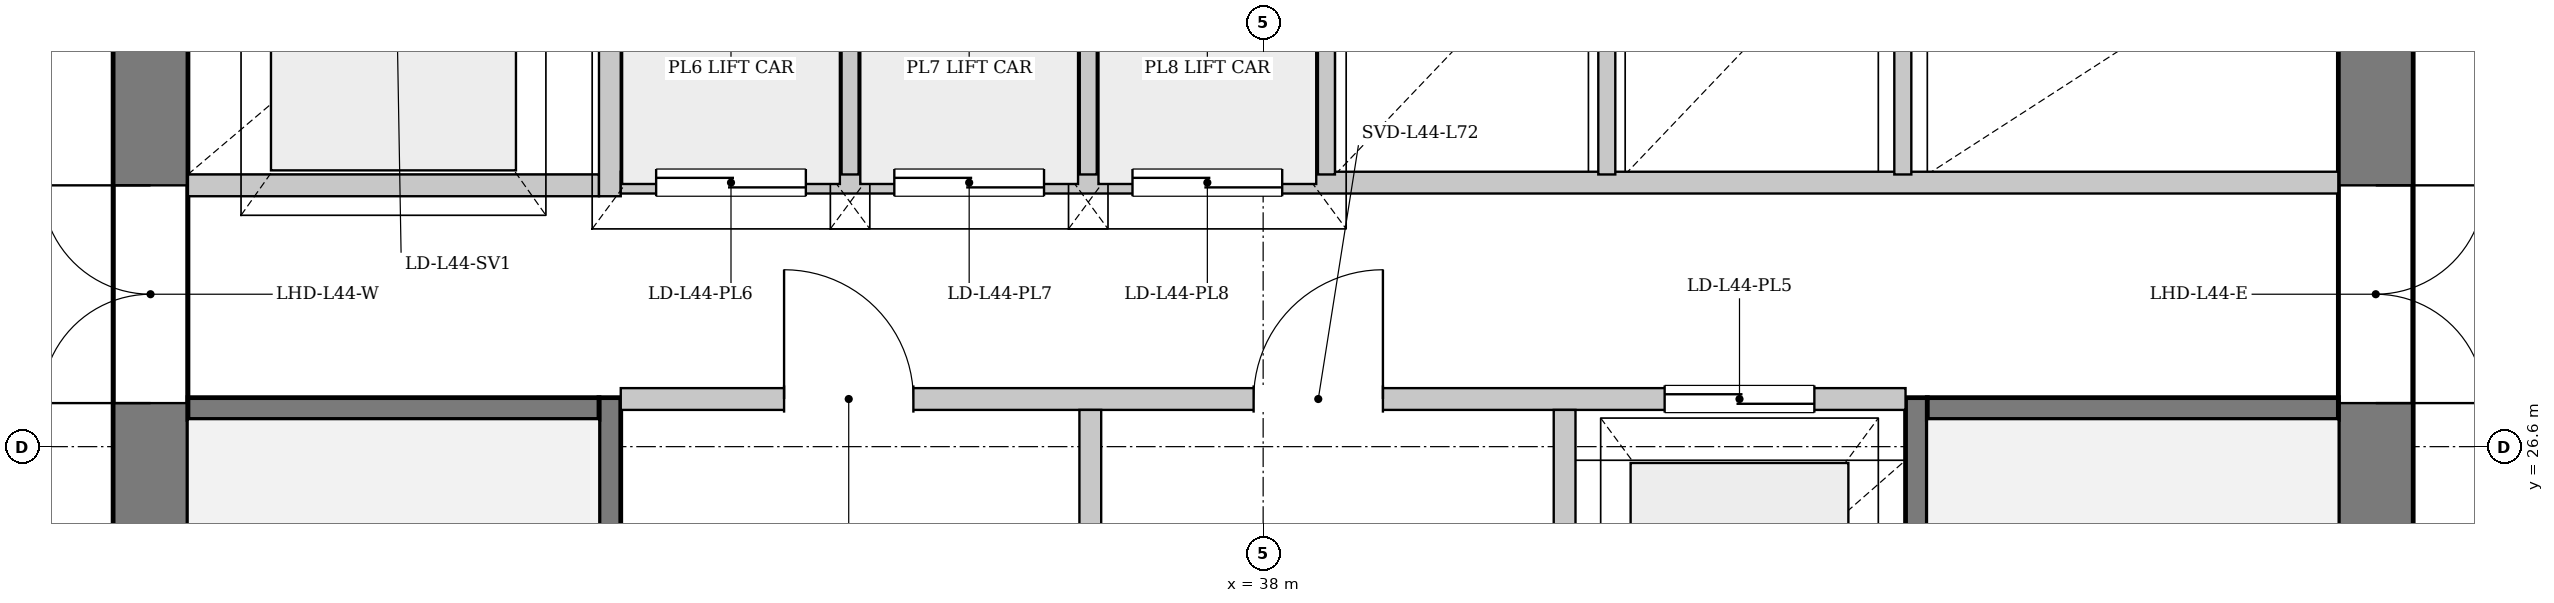
"""IFC4 building model, lengths in metres.
Left out: names, types, materials, properties, quantities, classifications, styles, units other than length and angle.
Written with IfcOpenShell. Run it as: python <this file> out.ifc"""

import sys

from ifc_helpers import new_model, si_unit, direction, frame, frame_2d, origin, place, context, subcontext, project, spatial, rectangle, extrude, source, transform, mapped, element, fill, save


model = new_model("IFC4")
c1 = context("Model", 3, precision=1e-05, world=origin(), true_north=direction((0.0, 1.0)))
c2 = subcontext(c1, "Body", "Model", "MODEL_VIEW")
j1 = project(units=[si_unit("LENGTHUNIT", "METRE"), si_unit("PLANEANGLEUNIT", "RADIAN")], contexts=[c1])
p1 = place(None, origin())
s1 = spatial("IfcSite", under=j1, at=p1, CompositionType="ELEMENT")
p2 = place(p1, origin())
s2 = spatial("IfcBuilding", under=s1, at=p2, CompositionType="ELEMENT")
p3 = place(p2, frame((0.0, 0.0, 167.9)))
s3 = spatial("IfcBuildingStorey", under=s2, at=p3, CompositionType="ELEMENT", Elevation=167.9)
p4 = place(p3, frame((29.825, 19.5, 0.0), z_axis=(0.0, 0.0, 1.0), x_axis=(0.0, 1.0, 0.0)))
e1 = element("IfcWall", 1, at=p4, inside=s3, PredefinedType="SHEAR", context=c2, shape_type="SweptSolid", body=[
    extrude(rectangle(XDim=14.2, YDim=0.55, at=frame_2d((7.1, 0.0))), origin(), (0.0, 0.0, 1.0), 3.33),
])
p5 = place(p4, frame((7.42, 0.0, 0.0)))
e2 = element("IfcOpeningElement", 2, at=p5, cuts=e1, PredefinedType="OPENING", context=c2, shape_type="SweptSolid", body=[
    extrude(rectangle(XDim=1.6, YDim=2.2, at=frame_2d((0.8, 1.1))), frame((0.0, 0.285, 0.0), z_axis=(0.0, -1.0, 0.0), x_axis=(1.0, 0.0, 0.0)), (0.0, 0.0, 1.0), 0.57),
])
p6 = place(p3, frame((46.175, 33.7, 0.0), z_axis=(0.0, 0.0, 1.0), x_axis=(0.0, -1.0, 0.0)))
e3 = element("IfcWall", 3, at=p6, inside=s3, PredefinedType="SHEAR", context=c2, shape_type="SweptSolid", body=[
    extrude(rectangle(XDim=14.2, YDim=0.55, at=frame_2d((7.1, 0.0))), origin(), (0.0, 0.0, 1.0), 3.33),
])
p7 = place(p6, frame((5.18, 0.0, 0.0)))
e4 = element("IfcOpeningElement", 4, at=p7, cuts=e3, PredefinedType="OPENING", context=c2, shape_type="SweptSolid", body=[
    extrude(rectangle(XDim=1.6, YDim=2.2, at=frame_2d((0.8, 1.1))), frame((0.0, 0.285, 0.0), z_axis=(0.0, -1.0, 0.0), x_axis=(1.0, 0.0, 0.0)), (0.0, 0.0, 1.0), 0.57),
])
p8 = place(p6, frame((2.05, 0.0, 0.0)))
e5 = element("IfcOpeningElement", 5, at=p8, cuts=e3, PredefinedType="OPENING", context=c2, shape_type="SweptSolid", body=[
    extrude(rectangle(XDim=0.95, YDim=2.1, at=frame_2d((0.475, 1.05))), frame((0.0, 0.285, 0.0), z_axis=(0.0, -1.0, 0.0), x_axis=(1.0, 0.0, 0.0)), (0.0, 0.0, 1.0), 0.57),
])
p9 = place(p3, frame((33.2, 19.5, 0.0), z_axis=(0.0, 0.0, 1.0), x_axis=(0.0, 1.0, 0.0)))
e6 = element("IfcWall", 6, at=p9, inside=s3, PredefinedType="PARTITIONING", context=c2, shape_type="SweptSolid", body=[
    extrude(rectangle(XDim=7.46, YDim=0.16, at=frame_2d((3.73, 0.0))), origin(), (0.0, 0.0, 1.0), 3.33),
])
p10 = place(p9, frame((0.08, 0.0, 0.0)))
e7 = element("IfcOpeningElement", 7, at=p10, cuts=e6, PredefinedType="OPENING", context=c2, shape_type="SweptSolid", body=[
    extrude(rectangle(XDim=1.32, YDim=2.2, at=frame_2d((0.66, 1.1))), frame((0.0, 0.09, 0.0), z_axis=(0.0, -1.0, 0.0), x_axis=(1.0, 0.0, 0.0)), (0.0, 0.0, 1.0), 0.18),
])
p11 = place(p3, frame((30.1, 26.88, 0.0), z_axis=(0.0, 0.0, 1.0), x_axis=(1.0, 0.0, 0.0)))
e8 = element("IfcWall", 8, at=p11, inside=s3, PredefinedType="PARTITIONING", context=c2, shape_type="SweptSolid", body=[
    extrude(rectangle(XDim=3.02, YDim=0.16, at=frame_2d((1.51, 0.0))), origin(), (0.0, 0.0, 1.0), 3.33),
])
p12 = place(p3, frame((42.8, 26.96, 0.0), z_axis=(0.0, 0.0, 1.0), x_axis=(0.0, -1.0, 0.0)))
e9 = element("IfcWall", 9, at=p12, inside=s3, PredefinedType="PARTITIONING", context=c2, shape_type="SweptSolid", body=[
    extrude(rectangle(XDim=7.46, YDim=0.16, at=frame_2d((3.73, 0.0))), origin(), (0.0, 0.0, 1.0), 3.33),
])
p13 = place(p12, frame((6.06, 0.0, 0.0)))
e10 = element("IfcOpeningElement", 10, at=p13, cuts=e9, PredefinedType="OPENING", context=c2, shape_type="SweptSolid", body=[
    extrude(rectangle(XDim=1.32, YDim=2.2, at=frame_2d((0.66, 1.1))), frame((0.0, 0.09, 0.0), z_axis=(0.0, -1.0, 0.0), x_axis=(1.0, 0.0, 0.0)), (0.0, 0.0, 1.0), 0.18),
])
for number, where, z_axis, x_axis in (
    (11, (42.88, 26.88, 0.0), (0.0, 0.0, 1.0), (1.0, 0.0, 0.0)),
    (12, (30.1, 28.52, 0.0), (0.0, 0.0, 1.0), (1.0, 0.0, 0.0)),
):
    element("IfcWall", number, at=place(p3, frame(where, z_axis=z_axis, x_axis=x_axis)), inside=s3, PredefinedType="PARTITIONING", context=c2, shape_type="SweptSolid", body=[
        extrude(rectangle(XDim=3.02, YDim=0.16, at=frame_2d((1.51, 0.0))), origin(), (0.0, 0.0, 1.0), 3.33),
    ])
p14 = place(p3, frame((33.2, 28.44, 0.0), z_axis=(0.0, 0.0, 1.0), x_axis=(0.0, 1.0, 0.0)))
e13 = element("IfcWall", 13, at=p14, inside=s3, PredefinedType="PARTITIONING", context=c2, shape_type="SweptSolid", body=[
    extrude(rectangle(XDim=5.26, YDim=0.16, at=frame_2d((2.63, 0.0))), origin(), (0.0, 0.0, 1.0), 3.33),
])
p15 = place(p3, frame((33.28, 26.95, 0.0), z_axis=(0.0, 0.0, 1.0), x_axis=(1.0, 0.0, 0.0)))
e14 = element("IfcWall", 14, at=p15, inside=s3, PredefinedType="PARTITIONING", context=c2, shape_type="SweptSolid", body=[
    extrude(rectangle(XDim=9.44, YDim=0.16, at=frame_2d((4.72, 0.0))), origin(), (0.0, 0.0, 1.0), 3.33),
])
p16 = place(p15, frame((1.2, 0.0, 0.0)))
e15 = element("IfcOpeningElement", 15, at=p16, cuts=e14, PredefinedType="OPENING", context=c2, shape_type="SweptSolid", body=[
    extrude(rectangle(XDim=0.95, YDim=2.1, at=frame_2d((0.475, 1.05))), frame((0.0, 0.09, 0.0), z_axis=(0.0, -1.0, 0.0), x_axis=(1.0, 0.0, 0.0)), (0.0, 0.0, 1.0), 0.18),
])
p17 = place(p15, frame((4.65, 0.0, 0.0)))
e16 = element("IfcOpeningElement", 16, at=p17, cuts=e14, PredefinedType="OPENING", context=c2, shape_type="SweptSolid", body=[
    extrude(rectangle(XDim=0.95, YDim=2.1, at=frame_2d((0.475, 1.05))), frame((0.0, 0.09, 0.0), z_axis=(0.0, -1.0, 0.0), x_axis=(1.0, 0.0, 0.0)), (0.0, 0.0, 1.0), 0.18),
])
p18 = place(p15, frame((7.67, 0.0, 0.0)))
e17 = element("IfcOpeningElement", 17, at=p18, cuts=e14, PredefinedType="OPENING", context=c2, shape_type="SweptSolid", body=[
    extrude(rectangle(XDim=1.1, YDim=2.2, at=frame_2d((0.55, 1.1))), frame((0.0, 0.09, 0.0), z_axis=(0.0, -1.0, 0.0), x_axis=(1.0, 0.0, 0.0)), (0.0, 0.0, 1.0), 0.18),
])
for number, where, z_axis, x_axis in (
    (18, (36.73, 24.56, 0.0), (0.0, 0.0, 1.0), (0.0, 1.0, 0.0)),
    (19, (40.215, 24.56, 0.0), (0.0, 0.0, 1.0), (0.0, 1.0, 0.0)),
):
    element("IfcWall", number, at=place(p3, frame(where, z_axis=z_axis, x_axis=x_axis)), inside=s3, PredefinedType="PARTITIONING", context=c2, shape_type="SweptSolid", body=[
        extrude(rectangle(XDim=2.31, YDim=0.16, at=frame_2d((1.155, 0.0))), origin(), (0.0, 0.0, 1.0), 3.33),
    ])
p19 = place(p3, frame((33.28, 28.54, 0.0), z_axis=(0.0, 0.0, 1.0), x_axis=(1.0, 0.0, 0.0)))
e20 = element("IfcWall", 20, at=p19, inside=s3, PredefinedType="PARTITIONING", context=c2, shape_type="SweptSolid", body=[
    extrude(rectangle(XDim=12.62, YDim=0.16, at=frame_2d((6.31, 0.0))), origin(), (0.0, 0.0, 1.0), 3.33),
])
p20 = place(p19, frame((0.26, 0.0, 0.0)))
e21 = element("IfcOpeningElement", 21, at=p20, cuts=e20, PredefinedType="OPENING", context=c2, shape_type="SweptSolid", body=[
    extrude(rectangle(XDim=1.1, YDim=2.2, at=frame_2d((0.55, 1.1))), frame((0.0, 0.09, 0.0), z_axis=(0.0, -1.0, 0.0), x_axis=(1.0, 0.0, 0.0)), (0.0, 0.0, 1.0), 0.18),
])
p21 = place(p19, frame((2.01, 0.0, 0.0)))
e22 = element("IfcOpeningElement", 22, at=p21, cuts=e20, PredefinedType="OPENING", context=c2, shape_type="SweptSolid", body=[
    extrude(rectangle(XDim=1.1, YDim=2.2, at=frame_2d((0.55, 1.1))), frame((0.0, 0.09, 0.0), z_axis=(0.0, -1.0, 0.0), x_axis=(1.0, 0.0, 0.0)), (0.0, 0.0, 1.0), 0.18),
])
p22 = place(p19, frame((3.76, 0.0, 0.0)))
e23 = element("IfcOpeningElement", 23, at=p22, cuts=e20, PredefinedType="OPENING", context=c2, shape_type="SweptSolid", body=[
    extrude(rectangle(XDim=1.1, YDim=2.2, at=frame_2d((0.55, 1.1))), frame((0.0, 0.09, 0.0), z_axis=(0.0, -1.0, 0.0), x_axis=(1.0, 0.0, 0.0)), (0.0, 0.0, 1.0), 0.18),
])
for number, where, z_axis, x_axis in (
    (24, (34.965, 28.6, 0.0), (0.0, 0.0, 1.0), (0.0, 1.0, 0.0)),
    (25, (36.715, 28.6, 0.0), (0.0, 0.0, 1.0), (0.0, 1.0, 0.0)),
    (26, (38.465, 28.6, 0.0), (0.0, 0.0, 1.0), (0.0, 1.0, 0.0)),
    (27, (40.525, 28.6, 0.0), (0.0, 0.0, 1.0), (0.0, 1.0, 0.0)),
    (28, (42.7, 28.6, 0.0), (0.0, 0.0, 1.0), (0.0, 1.0, 0.0)),
):
    element("IfcWall", number, at=place(p3, frame(where, z_axis=z_axis, x_axis=x_axis)), inside=s3, PredefinedType="PARTITIONING", context=c2, shape_type="SweptSolid", body=[
        extrude(rectangle(XDim=1.92, YDim=0.125, at=frame_2d((0.96, 0.0))), origin(), (0.0, 0.0, 1.0), 3.33),
    ])
m1 = source(origin(), c2, "Body", "SweptSolid", [
    extrude(rectangle(XDim=1.6, YDim=2.2, at=frame_2d((0.8, 1.1))), frame((0.0, 0.025, 0.0), z_axis=(0.0, -1.0, 0.0), x_axis=(1.0, 0.0, 0.0)), (0.0, 0.0, 1.0), 0.05),
])
p23 = place(p5, origin())
e29 = element("IfcDoor", 29, at=p23, inside=s3, OperationType="DOUBLE_DOOR_SINGLE_SWING", PredefinedType="DOOR", context=c2, shape_type="MappedRepresentation", body=[
    mapped(m1, transform((0.0, 0.0, 0.0), x_axis=(1.0, 0.0, 0.0), y_axis=(0.0, 1.0, 0.0), z_axis=(0.0, 0.0, 1.0), scale=1.0)),
])
fill(e2, e29)
p24 = place(p7, origin())
e30 = element("IfcDoor", 30, at=p24, inside=s3, OperationType="DOUBLE_DOOR_SINGLE_SWING", PredefinedType="DOOR", context=c2, shape_type="MappedRepresentation", body=[
    mapped(m1, transform((0.0, 0.0, 0.0), x_axis=(1.0, 0.0, 0.0), y_axis=(0.0, 1.0, 0.0), z_axis=(0.0, 0.0, 1.0), scale=1.0)),
])
fill(e4, e30)
m2 = source(origin(), c2, "Body", "SweptSolid", [
    extrude(rectangle(XDim=0.95, YDim=2.1, at=frame_2d((0.475, 1.05))), frame((0.0, 0.025, 0.0), z_axis=(0.0, -1.0, 0.0), x_axis=(1.0, 0.0, 0.0)), (0.0, 0.0, 1.0), 0.05),
])
p25 = place(p16, origin())
e31 = element("IfcDoor", 31, at=p25, inside=s3, OperationType="SINGLE_SWING_LEFT", PredefinedType="DOOR", context=c2, shape_type="MappedRepresentation", body=[
    mapped(m2, transform((0.0, 0.0, 0.0), x_axis=(1.0, 0.0, 0.0), y_axis=(0.0, 1.0, 0.0), z_axis=(0.0, 0.0, 1.0), scale=1.0)),
])
fill(e15, e31)
p26 = place(p17, origin())
e32 = element("IfcDoor", 32, at=p26, inside=s3, OperationType="SINGLE_SWING_RIGHT", PredefinedType="DOOR", context=c2, shape_type="MappedRepresentation", body=[
    mapped(m2, transform((0.0, 0.0, 0.0), x_axis=(1.0, 0.0, 0.0), y_axis=(0.0, 1.0, 0.0), z_axis=(0.0, 0.0, 1.0), scale=1.0)),
])
fill(e16, e32)
m3 = source(origin(), c2, "Body", "SweptSolid", [
    extrude(rectangle(XDim=1.1, YDim=2.2, at=frame_2d((0.55, 1.1))), frame((0.0, 0.025, 0.0), z_axis=(0.0, -1.0, 0.0), x_axis=(1.0, 0.0, 0.0)), (0.0, 0.0, 1.0), 0.05),
])
p27 = place(p18, origin())
e33 = element("IfcDoor", 33, at=p27, inside=s3, OperationType="DOUBLE_DOOR_SLIDING", PredefinedType="DOOR", context=c2, shape_type="MappedRepresentation", body=[
    mapped(m3, transform((0.0, 0.0, 0.0), x_axis=(1.0, 0.0, 0.0), y_axis=(0.0, 1.0, 0.0), z_axis=(0.0, 0.0, 1.0), scale=1.0)),
])
fill(e17, e33)
p28 = place(p20, origin())
e34 = element("IfcDoor", 34, at=p28, inside=s3, OperationType="DOUBLE_DOOR_SLIDING", PredefinedType="DOOR", context=c2, shape_type="MappedRepresentation", body=[
    mapped(m3, transform((0.0, 0.0, 0.0), x_axis=(1.0, 0.0, 0.0), y_axis=(0.0, 1.0, 0.0), z_axis=(0.0, 0.0, 1.0), scale=1.0)),
])
fill(e21, e34)
p29 = place(p21, origin())
e35 = element("IfcDoor", 35, at=p29, inside=s3, OperationType="DOUBLE_DOOR_SLIDING", PredefinedType="DOOR", context=c2, shape_type="MappedRepresentation", body=[
    mapped(m3, transform((0.0, 0.0, 0.0), x_axis=(1.0, 0.0, 0.0), y_axis=(0.0, 1.0, 0.0), z_axis=(0.0, 0.0, 1.0), scale=1.0)),
])
fill(e22, e35)
p30 = place(p22, origin())
e36 = element("IfcDoor", 36, at=p30, inside=s3, OperationType="DOUBLE_DOOR_SLIDING", PredefinedType="DOOR", context=c2, shape_type="MappedRepresentation", body=[
    mapped(m3, transform((0.0, 0.0, 0.0), x_axis=(1.0, 0.0, 0.0), y_axis=(0.0, 1.0, 0.0), z_axis=(0.0, 0.0, 1.0), scale=1.0)),
])
fill(e23, e36)
save(model, sys.argv[1])
